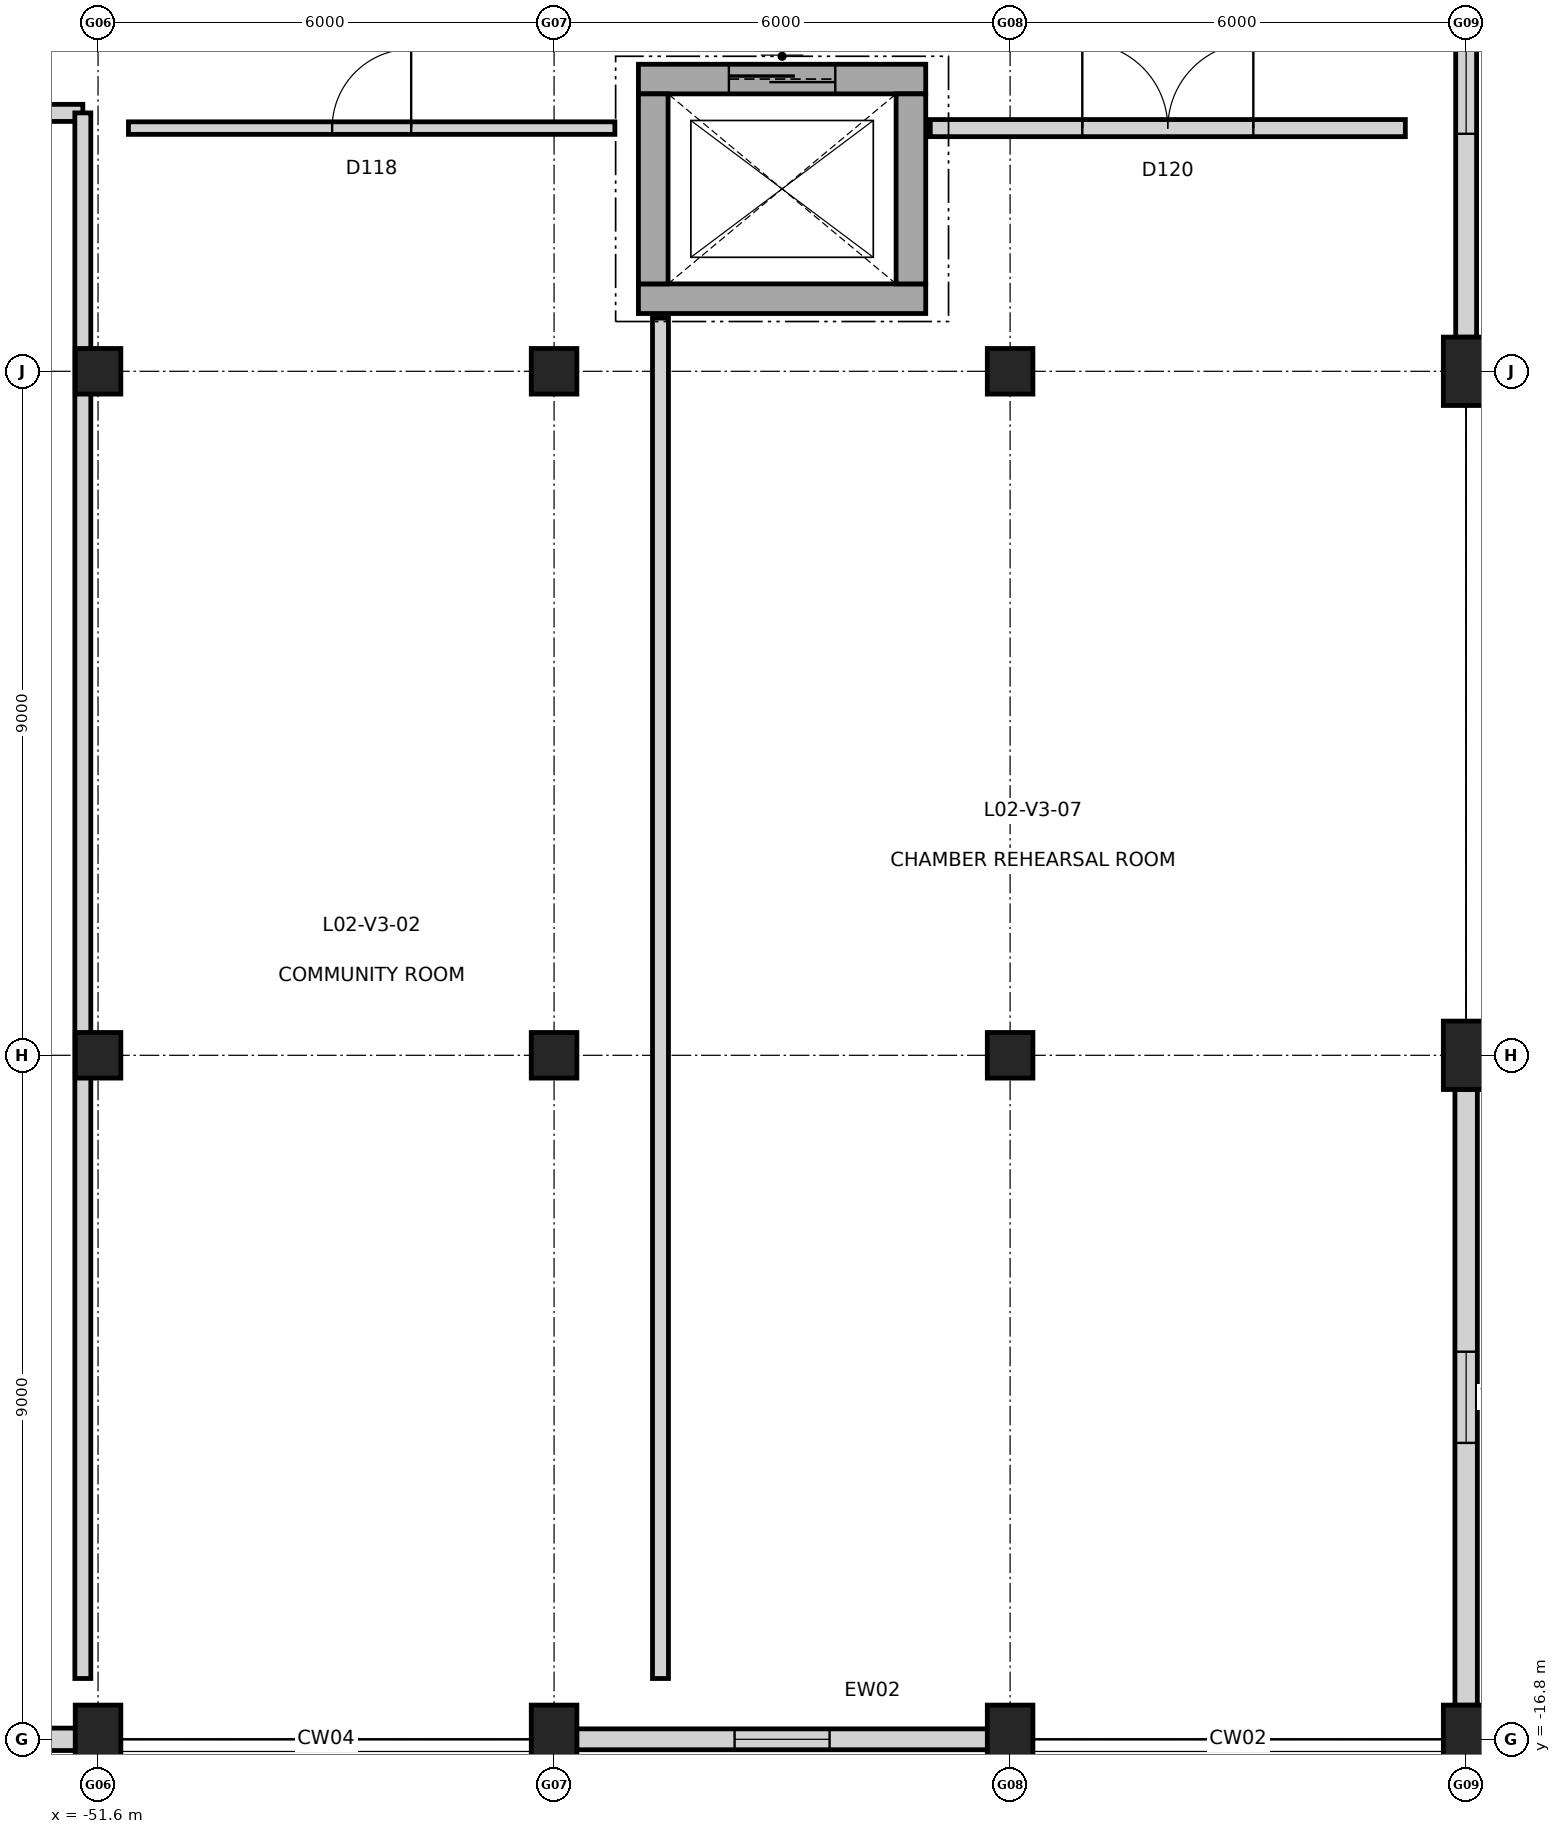
"""IFC4 building model, lengths in metres.
Left out: names, types, materials, properties, quantities, classifications, styles, units other than length and angle.
Written with IfcOpenShell. Run it as: python <this file> out.ifc"""

import sys

from ifc_helpers import new_model, si_unit, direction, frame, frame_2d, origin, origin_2d, place, context, subcontext, project, spatial, rectangle, extrude, element, fill, save


model = new_model("IFC4")
c1 = context("Model", 3, precision=1e-05, world=origin(), true_north=direction((0.0, 1.0)))
c2 = subcontext(c1, "Body", "Model", "MODEL_VIEW")
j1 = project(units=[si_unit("LENGTHUNIT", "METRE"), si_unit("PLANEANGLEUNIT", "RADIAN")], contexts=[c1])
p1 = place(None, origin())
s1 = spatial("IfcSite", under=j1, at=p1, CompositionType="ELEMENT")
p2 = place(p1, origin())
s2 = spatial("IfcBuilding", under=s1, at=p2, CompositionType="ELEMENT")
p3 = place(p2, frame((0.0, 0.0, 10.2)))
s3 = spatial("IfcBuildingStorey", under=s2, at=p3, CompositionType="ELEMENT", Elevation=10.2)
p4 = place(p3, frame((-51.6, -16.8, 0.0), z_axis=(0.0, 0.0, 1.0), x_axis=(1.0, 0.0, 0.0)))
e1 = element("IfcColumn", 1, at=p4, inside=s3, PredefinedType="COLUMN", context=c2, shape_type="SweptSolid", body=[
    extrude(rectangle(XDim=0.6, YDim=0.9, at=origin_2d()), origin(), (0.0, 0.0, 1.0), 4.8),
])
for number, where, z_axis, x_axis in (
    (2, (-51.6, -7.8, 0.0), (0.0, 0.0, 1.0), (1.0, 0.0, 0.0)),
    (3, (-51.6, 1.2, 0.0), (0.0, 0.0, 1.0), (1.0, 0.0, 0.0)),
):
    element("IfcColumn", number, at=place(p3, frame(where, z_axis=z_axis, x_axis=x_axis)), inside=s3, PredefinedType="COLUMN", context=c2, shape_type="SweptSolid", body=[
        extrude(rectangle(XDim=0.6, YDim=0.6, at=origin_2d()), origin(), (0.0, 0.0, 1.0), 4.8),
    ])
p5 = place(p3, frame((-45.6, -16.8, 0.0), z_axis=(0.0, 0.0, 1.0), x_axis=(1.0, 0.0, 0.0)))
e4 = element("IfcColumn", 4, at=p5, inside=s3, PredefinedType="COLUMN", context=c2, shape_type="SweptSolid", body=[
    extrude(rectangle(XDim=0.6, YDim=0.9, at=origin_2d()), origin(), (0.0, 0.0, 1.0), 4.8),
])
for number, where, z_axis, x_axis in (
    (5, (-45.6, -7.8, 0.0), (0.0, 0.0, 1.0), (1.0, 0.0, 0.0)),
    (6, (-45.6, 1.2, 0.0), (0.0, 0.0, 1.0), (1.0, 0.0, 0.0)),
):
    element("IfcColumn", number, at=place(p3, frame(where, z_axis=z_axis, x_axis=x_axis)), inside=s3, PredefinedType="COLUMN", context=c2, shape_type="SweptSolid", body=[
        extrude(rectangle(XDim=0.6, YDim=0.6, at=origin_2d()), origin(), (0.0, 0.0, 1.0), 4.8),
    ])
p6 = place(p3, frame((-39.6, -16.8, 0.0), z_axis=(0.0, 0.0, 1.0), x_axis=(1.0, 0.0, 0.0)))
e7 = element("IfcColumn", 7, at=p6, inside=s3, PredefinedType="COLUMN", context=c2, shape_type="SweptSolid", body=[
    extrude(rectangle(XDim=0.6, YDim=0.9, at=origin_2d()), origin(), (0.0, 0.0, 1.0), 4.8),
])
for number, where, z_axis, x_axis in (
    (8, (-39.6, -7.8, 0.0), (0.0, 0.0, 1.0), (1.0, 0.0, 0.0)),
    (9, (-39.6, 1.2, 0.0), (0.0, 0.0, 1.0), (1.0, 0.0, 0.0)),
):
    element("IfcColumn", number, at=place(p3, frame(where, z_axis=z_axis, x_axis=x_axis)), inside=s3, PredefinedType="COLUMN", context=c2, shape_type="SweptSolid", body=[
        extrude(rectangle(XDim=0.6, YDim=0.6, at=origin_2d()), origin(), (0.0, 0.0, 1.0), 4.8),
    ])
for number, where, z_axis, x_axis in (
    (10, (-33.6, -16.8, 0.0), (0.0, 0.0, 1.0), (1.0, 0.0, 0.0)),
    (11, (-33.6, -7.8, 0.0), (0.0, 0.0, 1.0), (1.0, 0.0, 0.0)),
    (12, (-33.6, 1.2, 0.0), (0.0, 0.0, 1.0), (1.0, 0.0, 0.0)),
):
    element("IfcColumn", number, at=place(p3, frame(where, z_axis=z_axis, x_axis=x_axis)), inside=s3, PredefinedType="COLUMN", context=c2, shape_type="SweptSolid", body=[
        extrude(rectangle(XDim=0.6, YDim=0.9, at=origin_2d()), origin(), (0.0, 0.0, 1.0), 4.8),
    ])
p7 = place(p3, frame((-39.898, -16.8, 0.0), z_axis=(0.0, 0.0, 1.0), x_axis=(-1.0, 0.0, 0.0)))
e13 = element("IfcWall", 13, at=p7, inside=s3, PredefinedType="STANDARD", context=c2, shape_type="SweptSolid", body=[
    extrude(rectangle(XDim=5.404, YDim=0.275, at=frame_2d((2.702, 0.0))), origin(), (0.0, 0.0, 1.0), 3.745),
])
p8 = place(p7, frame((2.077, 0.0, 0.85)))
e14 = element("IfcOpeningElement", 14, at=p8, cuts=e13, PredefinedType="OPENING", context=c2, shape_type="SweptSolid", body=[
    extrude(rectangle(XDim=1.25, YDim=1.6, at=frame_2d((0.625, 0.8))), frame((0.0, 0.147, 0.0), z_axis=(0.0, -1.0, 0.0), x_axis=(1.0, 0.0, 0.0)), (0.0, 0.0, 1.0), 0.295),
])
p9 = place(p3, frame((-51.898, -16.8, 0.0), z_axis=(0.0, 0.0, 1.0), x_axis=(-1.0, 0.0, 0.0)))
e15 = element("IfcWall", 15, at=p9, inside=s3, PredefinedType="STANDARD", context=c2, shape_type="SweptSolid", body=[
    extrude(rectangle(XDim=5.404, YDim=0.295, at=frame_2d((2.702, 0.0))), origin(), (0.0, 0.0, 1.0), 3.745),
])
p10 = place(p9, frame((2.002, 0.0, 0.85)))
e16 = element("IfcOpeningElement", 16, at=p10, cuts=e15, PredefinedType="OPENING", context=c2, shape_type="SweptSolid", body=[
    extrude(rectangle(XDim=1.4, YDim=1.6, at=frame_2d((0.7, 0.8))), frame((0.0, 0.157, 0.0), z_axis=(0.0, -1.0, 0.0), x_axis=(1.0, 0.0, 0.0)), (0.0, 0.0, 1.0), 0.315),
])
p11 = place(p3, frame((-33.6, 9.752, 0.0), z_axis=(0.0, 0.0, 1.0), x_axis=(0.0, -1.0, 0.0)))
e17 = element("IfcWall", 17, at=p11, inside=s3, PredefinedType="STANDARD", context=c2, shape_type="SweptSolid", body=[
    extrude(rectangle(XDim=8.104, YDim=0.275, at=frame_2d((4.052, 0.0))), origin(), (0.0, 0.0, 1.0), 3.829),
])
p12 = place(p11, frame((2.677, 0.0, 0.85)))
e18 = element("IfcOpeningElement", 18, at=p12, cuts=e17, PredefinedType="OPENING", context=c2, shape_type="SweptSolid", body=[
    extrude(rectangle(XDim=2.75, YDim=1.95, at=frame_2d((1.375, 0.975))), frame((0.0, 0.147, 0.0), z_axis=(0.0, -1.0, 0.0), x_axis=(1.0, 0.0, 0.0)), (0.0, 0.0, 1.0), 0.295),
])
p13 = place(p3, frame((-33.6, -8.248, 0.0), z_axis=(0.0, 0.0, 1.0), x_axis=(0.0, -1.0, 0.0)))
e19 = element("IfcWall", 19, at=p13, inside=s3, PredefinedType="STANDARD", context=c2, shape_type="SweptSolid", body=[
    extrude(rectangle(XDim=8.104, YDim=0.295, at=frame_2d((4.052, 0.0))), origin(), (0.0, 0.0, 1.0), 3.829),
])
p14 = place(p13, frame((3.452, 0.0, 0.85)))
e20 = element("IfcOpeningElement", 20, at=p14, cuts=e19, PredefinedType="OPENING", context=c2, shape_type="SweptSolid", body=[
    extrude(rectangle(XDim=1.2, YDim=2.1, at=frame_2d((0.6, 1.05))), frame((0.0, 0.157, 0.0), z_axis=(0.0, -1.0, 0.0), x_axis=(1.0, 0.0, 0.0)), (0.0, 0.0, 1.0), 0.315),
])
p15 = place(p3, frame((-40.71, 2.155, 0.0), z_axis=(0.0, 0.0, 1.0), x_axis=(-1.0, 0.0, 0.0)))
e21 = element("IfcWall", 21, at=p15, inside=s3, PredefinedType="SHEAR", context=c2, shape_type="SweptSolid", body=[
    extrude(rectangle(XDim=3.78, YDim=0.39, at=frame_2d((1.89, 0.0))), origin(), (0.0, 0.0, 1.0), 4.8),
])
p16 = place(p3, frame((-44.49, 5.045, 0.0), z_axis=(0.0, 0.0, 1.0), x_axis=(1.0, 0.0, 0.0)))
e22 = element("IfcWall", 22, at=p16, inside=s3, PredefinedType="SHEAR", context=c2, shape_type="SweptSolid", body=[
    extrude(rectangle(XDim=3.78, YDim=0.39, at=frame_2d((1.89, 0.0))), origin(), (0.0, 0.0, 1.0), 4.8),
])
p17 = place(p16, frame((1.19, 0.0, 0.0)))
e23 = element("IfcOpeningElement", 23, at=p17, cuts=e22, PredefinedType="OPENING", context=c2, shape_type="SweptSolid", body=[
    extrude(rectangle(XDim=1.4, YDim=2.2, at=frame_2d((0.7, 1.1))), frame((0.0, 0.205, 0.0), z_axis=(0.0, -1.0, 0.0), x_axis=(1.0, 0.0, 0.0)), (0.0, 0.0, 1.0), 0.41),
])
for number, where, z_axis, x_axis in (
    (24, (-44.295, 2.35, 0.0), (0.0, 0.0, 1.0), (0.0, 1.0, 0.0)),
    (25, (-40.905, 4.85, 0.0), (0.0, 0.0, 1.0), (0.0, -1.0, 0.0)),
):
    element("IfcWall", number, at=place(p3, frame(where, z_axis=z_axis, x_axis=x_axis)), inside=s3, PredefinedType="SHEAR", context=c2, shape_type="SweptSolid", body=[
        extrude(rectangle(XDim=2.5, YDim=0.39, at=frame_2d((1.25, 0.0))), origin(), (0.0, 0.0, 1.0), 4.8),
    ])
p18 = place(p3, frame((-74.8, 4.6, 0.0), z_axis=(0.0, 0.0, 1.0), x_axis=(1.0, 0.0, 0.0)))
e26 = element("IfcWall", 26, at=p18, inside=s3, PredefinedType="PARTITIONING", context=c2, shape_type="SweptSolid", body=[
    extrude(rectangle(XDim=23.0, YDim=0.225, at=frame_2d((11.5, 0.0))), origin(), (0.0, 0.0, 1.0), 4.42),
])
p19 = place(p18, frame((10.69, 0.0, 0.0)))
e27 = element("IfcOpeningElement", 27, at=p19, cuts=e26, PredefinedType="OPENING", context=c2, shape_type="SweptSolid", body=[
    extrude(rectangle(XDim=1.62, YDim=2.2, at=frame_2d((0.81, 1.1))), frame((0.0, 0.123, 0.0), z_axis=(0.0, -1.0, 0.0), x_axis=(1.0, 0.0, 0.0)), (0.0, 0.0, 1.0), 0.245),
])
p20 = place(p3, frame((-51.8, -16.0, 0.0), z_axis=(0.0, 0.0, 1.0), x_axis=(0.0, 1.0, 0.0)))
e28 = element("IfcWall", 28, at=p20, inside=s3, PredefinedType="PARTITIONING", context=c2, shape_type="SweptSolid", body=[
    extrude(rectangle(XDim=20.6, YDim=0.21, at=frame_2d((10.3, 0.0))), origin(), (0.0, 0.0, 1.0), 3.59),
])
p21 = place(p3, frame((-51.2, 4.4, 0.0), z_axis=(0.0, 0.0, 1.0), x_axis=(1.0, 0.0, 0.0)))
e29 = element("IfcWall", 29, at=p21, inside=s3, PredefinedType="PARTITIONING", context=c2, shape_type="SweptSolid", body=[
    extrude(rectangle(XDim=6.4, YDim=0.165, at=frame_2d((3.2, 0.0))), origin(), (0.0, 0.0, 1.0), 4.42),
])
p22 = place(p21, frame((2.68, 0.0, 0.0)))
e30 = element("IfcOpeningElement", 30, at=p22, cuts=e29, PredefinedType="OPENING", context=c2, shape_type="SweptSolid", body=[
    extrude(rectangle(XDim=1.04, YDim=2.2, at=frame_2d((0.52, 1.1))), frame((0.0, 0.093, 0.0), z_axis=(0.0, -1.0, 0.0), x_axis=(1.0, 0.0, 0.0)), (0.0, 0.0, 1.0), 0.185),
])
p23 = place(p3, frame((-40.65, 4.4, 0.0), z_axis=(0.0, 0.0, 1.0), x_axis=(1.0, 0.0, 0.0)))
e31 = element("IfcWall", 31, at=p23, inside=s3, PredefinedType="PARTITIONING", context=c2, shape_type="SweptSolid", body=[
    extrude(rectangle(XDim=6.25, YDim=0.225, at=frame_2d((3.125, 0.0))), origin(), (0.0, 0.0, 1.0), 4.42),
])
p24 = place(p23, frame((2.0, 0.0, 0.0)))
e32 = element("IfcOpeningElement", 32, at=p24, cuts=e31, PredefinedType="OPENING", context=c2, shape_type="SweptSolid", body=[
    extrude(rectangle(XDim=2.25, YDim=2.45, at=frame_2d((1.125, 1.225))), frame((0.0, 0.123, 0.0), z_axis=(0.0, -1.0, 0.0), x_axis=(1.0, 0.0, 0.0)), (0.0, 0.0, 1.0), 0.245),
])
p25 = place(p3, frame((-44.2, -16.0, 0.0), z_axis=(0.0, 0.0, 1.0), x_axis=(0.0, 1.0, 0.0)))
e33 = element("IfcWall", 33, at=p25, inside=s3, PredefinedType="PARTITIONING", context=c2, shape_type="SweptSolid", body=[
    extrude(rectangle(XDim=17.9, YDim=0.21, at=frame_2d((8.95, 0.0))), origin(), (0.0, 0.0, 1.0), 4.42),
])
p26 = place(p8, origin())
e34 = element("IfcWindow", 34, at=p26, inside=s3, PartitioningType="SINGLE_PANEL", PredefinedType="WINDOW", context=c2, shape_type="SweptSolid", body=[
    extrude(rectangle(XDim=1.25, YDim=1.6, at=frame_2d((0.625, 0.8))), frame((0.0, 0.03, 0.0), z_axis=(0.0, -1.0, 0.0), x_axis=(1.0, 0.0, 0.0)), (0.0, 0.0, 1.0), 0.06),
])
fill(e14, e34)
p27 = place(p12, origin())
e35 = element("IfcWindow", 35, at=p27, inside=s3, PartitioningType="SINGLE_PANEL", PredefinedType="WINDOW", context=c2, shape_type="SweptSolid", body=[
    extrude(rectangle(XDim=2.75, YDim=1.95, at=frame_2d((1.375, 0.975))), frame((0.0, 0.03, 0.0), z_axis=(0.0, -1.0, 0.0), x_axis=(1.0, 0.0, 0.0)), (0.0, 0.0, 1.0), 0.06),
])
fill(e18, e35)
p28 = place(p14, origin())
e36 = element("IfcWindow", 36, at=p28, inside=s3, PartitioningType="SINGLE_PANEL", PredefinedType="WINDOW", context=c2, shape_type="SweptSolid", body=[
    extrude(rectangle(XDim=1.2, YDim=2.1, at=frame_2d((0.6, 1.05))), frame((0.0, 0.03, 0.0), z_axis=(0.0, -1.0, 0.0), x_axis=(1.0, 0.0, 0.0)), (0.0, 0.0, 1.0), 0.06),
])
fill(e20, e36)
p29 = place(p17, origin())
e37 = element("IfcDoor", 37, at=p29, inside=s3, OperationType="SLIDING_TO_LEFT", PredefinedType="DOOR", context=c2, shape_type="SweptSolid", body=[
    extrude(rectangle(XDim=1.4, YDim=2.2, at=frame_2d((0.7, 1.1))), frame((0.0, 0.025, 0.0), z_axis=(0.0, -1.0, 0.0), x_axis=(1.0, 0.0, 0.0)), (0.0, 0.0, 1.0), 0.05),
])
fill(e23, e37)
p30 = place(p22, origin())
e38 = element("IfcDoor", 38, at=p30, inside=s3, OperationType="SINGLE_SWING_RIGHT", PredefinedType="DOOR", context=c2, shape_type="SweptSolid", body=[
    extrude(rectangle(XDim=1.04, YDim=2.2, at=frame_2d((0.52, 1.1))), frame((0.0, 0.025, 0.0), z_axis=(0.0, -1.0, 0.0), x_axis=(1.0, 0.0, 0.0)), (0.0, 0.0, 1.0), 0.05),
])
fill(e30, e38)
p31 = place(p24, origin())
e39 = element("IfcDoor", 39, at=p31, inside=s3, OperationType="DOUBLE_DOOR_SINGLE_SWING", PredefinedType="DOOR", context=c2, shape_type="SweptSolid", body=[
    extrude(rectangle(XDim=2.25, YDim=2.45, at=frame_2d((1.125, 1.225))), frame((0.0, 0.025, 0.0), z_axis=(0.0, -1.0, 0.0), x_axis=(1.0, 0.0, 0.0)), (0.0, 0.0, 1.0), 0.05),
])
fill(e32, e39)
save(model, sys.argv[1])
